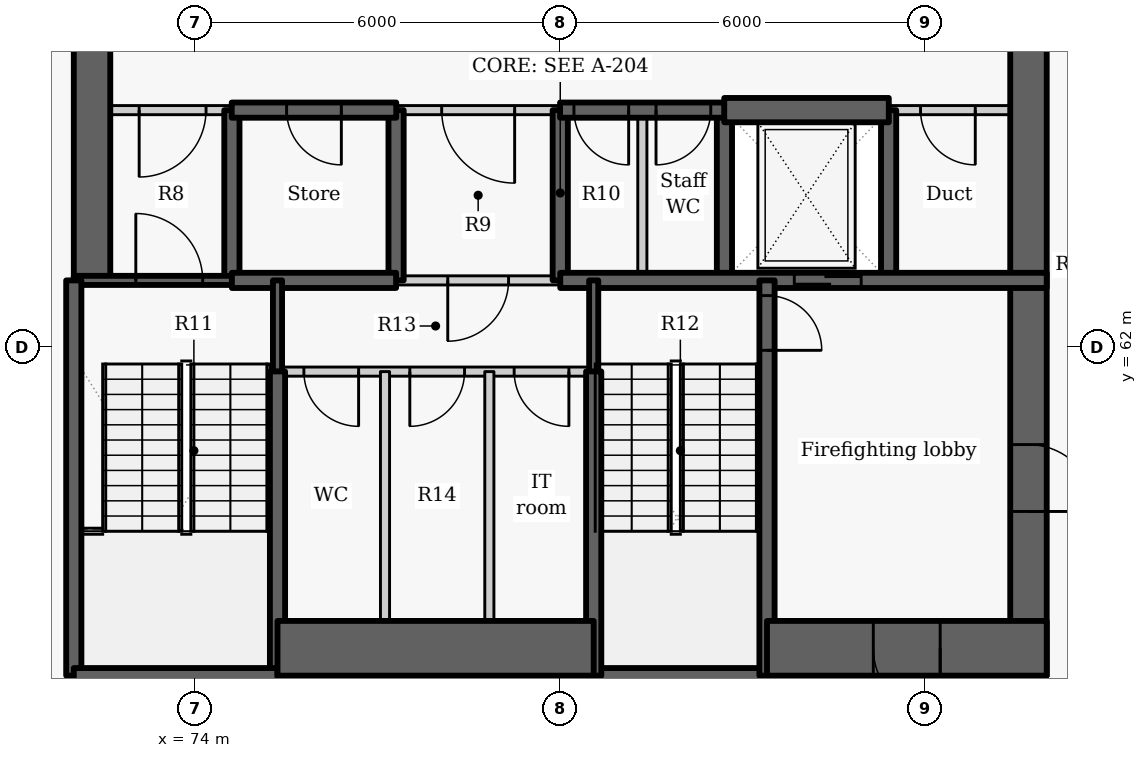
"""IFC4 building model, lengths in metres.
Left out: names, types, materials, properties, quantities, classifications, styles, units other than length and angle.
Written with IfcOpenShell. Run it as: python <this file> out.ifc"""

import sys

from ifc_helpers import new_model, si_unit, direction, frame, frame_2d, origin, place, context, subcontext, project, spatial, rectangle, extrude, element, fill, save


model = new_model("IFC4")
c1 = context("Model", 3, precision=1e-05, world=origin(), true_north=direction((0.0, 1.0)))
c2 = subcontext(c1, "Body", "Model", "MODEL_VIEW")
j1 = project(units=[si_unit("LENGTHUNIT", "METRE"), si_unit("PLANEANGLEUNIT", "RADIAN")], contexts=[c1])
p1 = place(None, origin())
s1 = spatial("IfcSite", under=j1, at=p1, CompositionType="ELEMENT")
p2 = place(p1, origin())
s2 = spatial("IfcBuilding", under=s1, at=p2, CompositionType="ELEMENT")
p3 = place(p2, frame((0.0, 0.0, 15.6)))
s3 = spatial("IfcBuildingStorey", under=s2, at=p3, CompositionType="ELEMENT", Elevation=15.6)
p4 = place(p3, frame((74.6, 63.1, -0.3), z_axis=(0.0, 0.0, 1.0), x_axis=(0.0, 1.0, 0.0)))
e1 = element("IfcWall", 1, at=p4, inside=s3, PredefinedType="SHEAR", context=c2, shape_type="SweptSolid", body=[
    extrude(rectangle(XDim=2.8, YDim=0.25, at=frame_2d((1.4, 0.0))), origin(), (0.0, 0.0, 1.0), 4.2),
])
p5 = place(p3, frame((72.3, 63.1, -0.3), z_axis=(0.0, 0.0, 1.0), x_axis=(0.0, 1.0, 0.0)))
e2 = element("IfcWall", 2, at=p5, inside=s3, PredefinedType="SHEAR", context=c2, shape_type="SweptSolid", body=[
    extrude(rectangle(XDim=9.1, YDim=0.6, at=frame_2d((4.55, 0.0))), origin(), (0.0, 0.0, 1.0), 4.2),
])
for number, where, z_axis, x_axis in (
    (3, (77.3, 63.1, -0.3), (0.0, 0.0, 1.0), (0.0, 1.0, 0.0)),
    (4, (80.0, 63.1, -0.3), (0.0, 0.0, 1.0), (0.0, 1.0, 0.0)),
    (5, (82.7, 63.1, -0.3), (0.0, 0.0, 1.0), (0.0, 1.0, 0.0)),
    (6, (85.4, 63.1, -0.3), (0.0, 0.0, 1.0), (0.0, 1.0, 0.0)),
):
    element("IfcWall", number, at=place(p3, frame(where, z_axis=z_axis, x_axis=x_axis)), inside=s3, PredefinedType="SHEAR", context=c2, shape_type="SweptSolid", body=[
        extrude(rectangle(XDim=2.8, YDim=0.25, at=frame_2d((1.4, 0.0))), origin(), (0.0, 0.0, 1.0), 4.2),
    ])
p6 = place(p3, frame((87.7, 72.2, -0.3), z_axis=(0.0, 0.0, 1.0), x_axis=(0.0, -1.0, 0.0)))
e7 = element("IfcWall", 7, at=p6, inside=s3, PredefinedType="SHEAR", context=c2, shape_type="SweptSolid", body=[
    extrude(rectangle(XDim=15.6, YDim=0.6, at=frame_2d((7.8, 0.0))), origin(), (0.0, 0.0, 1.0), 4.2),
])
p7 = place(p6, frame((11.8, 0.0, 0.3)))
e8 = element("IfcOpeningElement", 8, at=p7, cuts=e7, PredefinedType="OPENING", context=c2, shape_type="SweptSolid", body=[
    extrude(rectangle(XDim=1.1, YDim=2.1, at=frame_2d((0.55, 1.05))), frame((0.0, 0.31, 0.0), z_axis=(0.0, -1.0, 0.0), x_axis=(1.0, 0.0, 0.0)), (0.0, 0.0, 1.0), 0.62),
])
p8 = place(p3, frame((74.603, 65.9, 0.0), z_axis=(0.0, 0.0, 1.0), x_axis=(-1.0, 0.0, 0.0)))
e9 = element("IfcWall", 9, at=p8, inside=s3, PredefinedType="PARTITIONING", context=c2, shape_type="SweptSolid", body=[
    extrude(rectangle(XDim=2.603, YDim=0.15, at=frame_2d((1.302, 0.0))), origin(), (0.0, 0.0, 1.0), 3.9),
])
p9 = place(p8, frame((0.428, 0.0, 0.0)))
e10 = element("IfcOpeningElement", 10, at=p9, cuts=e9, PredefinedType="OPENING", context=c2, shape_type="SweptSolid", body=[
    extrude(rectangle(XDim=1.1, YDim=2.1, at=frame_2d((0.55, 1.05))), frame((0.0, 0.085, 0.0), z_axis=(0.0, -1.0, 0.0), x_axis=(1.0, 0.0, 0.0)), (0.0, 0.0, 1.0), 0.17),
])
p10 = place(p3, frame((80.003, 65.9, 0.0), z_axis=(0.0, 0.0, 1.0), x_axis=(-1.0, 0.0, 0.0)))
e11 = element("IfcWall", 11, at=p10, inside=s3, PredefinedType="PARTITIONING", context=c2, shape_type="SweptSolid", body=[
    extrude(rectangle(XDim=2.706, YDim=0.15, at=frame_2d((1.353, 0.0))), origin(), (0.0, 0.0, 1.0), 3.9),
])
p11 = place(p10, frame((0.753, 0.0, 0.0)))
e12 = element("IfcOpeningElement", 12, at=p11, cuts=e11, PredefinedType="OPENING", context=c2, shape_type="SweptSolid", body=[
    extrude(rectangle(XDim=1.2, YDim=2.1, at=frame_2d((0.6, 1.05))), frame((0.0, 0.085, 0.0), z_axis=(0.0, -1.0, 0.0), x_axis=(1.0, 0.0, 0.0)), (0.0, 0.0, 1.0), 0.17),
])
p12 = place(p3, frame((88.0, 65.9, 0.0), z_axis=(0.0, 0.0, 1.0), x_axis=(-1.0, 0.0, 0.0)))
e13 = element("IfcWall", 13, at=p12, inside=s3, PredefinedType="PARTITIONING", context=c2, shape_type="SweptSolid", body=[
    extrude(rectangle(XDim=2.603, YDim=0.15, at=frame_2d((1.302, 0.0))), origin(), (0.0, 0.0, 1.0), 3.9),
])
p13 = place(p12, frame((1.175, 0.0, 0.0)))
e14 = element("IfcOpeningElement", 14, at=p13, cuts=e13, PredefinedType="OPENING", context=c2, shape_type="SweptSolid", body=[
    extrude(rectangle(XDim=0.9, YDim=2.1, at=frame_2d((0.45, 1.05))), frame((0.0, 0.085, 0.0), z_axis=(0.0, -1.0, 0.0), x_axis=(1.0, 0.0, 0.0)), (0.0, 0.0, 1.0), 0.17),
])
p14 = place(p3, frame((77.303, 65.9, -0.3), z_axis=(0.0, 0.0, 1.0), x_axis=(-1.0, 0.0, 0.0)))
e15 = element("IfcWall", 15, at=p14, inside=s3, PredefinedType="SHEAR", context=c2, shape_type="SweptSolid", body=[
    extrude(rectangle(XDim=2.706, YDim=0.25, at=frame_2d((1.353, 0.0))), origin(), (0.0, 0.0, 1.0), 4.2),
])
p15 = place(p14, frame((0.903, 0.0, 0.3)))
e16 = element("IfcOpeningElement", 16, at=p15, cuts=e15, PredefinedType="OPENING", context=c2, shape_type="SweptSolid", body=[
    extrude(rectangle(XDim=0.9, YDim=2.1, at=frame_2d((0.45, 1.05))), frame((0.0, 0.135, 0.0), z_axis=(0.0, -1.0, 0.0), x_axis=(1.0, 0.0, 0.0)), (0.0, 0.0, 1.0), 0.27),
])
p16 = place(p3, frame((82.703, 65.9, -0.3), z_axis=(0.0, 0.0, 1.0), x_axis=(-1.0, 0.0, 0.0)))
e17 = element("IfcWall", 17, at=p16, inside=s3, PredefinedType="SHEAR", context=c2, shape_type="SweptSolid", body=[
    extrude(rectangle(XDim=2.706, YDim=0.25, at=frame_2d((1.353, 0.0))), origin(), (0.0, 0.0, 1.0), 4.2),
])
p17 = place(p16, frame((1.578, 0.0, 0.3)))
e18 = element("IfcOpeningElement", 18, at=p17, cuts=e17, PredefinedType="OPENING", context=c2, shape_type="SweptSolid", body=[
    extrude(rectangle(XDim=0.9, YDim=2.1, at=frame_2d((0.45, 1.05))), frame((0.0, 0.135, 0.0), z_axis=(0.0, -1.0, 0.0), x_axis=(1.0, 0.0, 0.0)), (0.0, 0.0, 1.0), 0.27),
])
p18 = place(p16, frame((0.228, 0.0, 0.3)))
e19 = element("IfcOpeningElement", 19, at=p18, cuts=e17, PredefinedType="OPENING", context=c2, shape_type="SweptSolid", body=[
    extrude(rectangle(XDim=0.9, YDim=2.1, at=frame_2d((0.45, 1.05))), frame((0.0, 0.135, 0.0), z_axis=(0.0, -1.0, 0.0), x_axis=(1.0, 0.0, 0.0)), (0.0, 0.0, 1.0), 0.27),
])
p19 = place(p3, frame((82.697, 65.9, -0.3), z_axis=(0.0, 0.0, 1.0), x_axis=(1.0, 0.0, 0.0)))
e20 = element("IfcWall", 20, at=p19, inside=s3, PredefinedType="SHEAR", context=c2, shape_type="SweptSolid", body=[
    extrude(rectangle(XDim=2.706, YDim=0.4, at=frame_2d((1.353, 0.0))), origin(), (0.0, 0.0, 1.0), 4.2),
])
p20 = place(p3, frame((72.0, 63.1, -0.3), z_axis=(0.0, 0.0, 1.0), x_axis=(1.0, 0.0, 0.0)))
e21 = element("IfcWall", 21, at=p20, inside=s3, PredefinedType="SHEAR", context=c2, shape_type="SweptSolid", body=[
    extrude(rectangle(XDim=2.6, YDim=0.15, at=frame_2d((1.3, 0.0))), origin(), (0.0, 0.0, 1.0), 4.2),
])
p21 = place(p20, frame((1.02, 0.0, 0.3)))
e22 = element("IfcOpeningElement", 22, at=p21, cuts=e21, PredefinedType="OPENING", context=c2, shape_type="SweptSolid", body=[
    extrude(rectangle(XDim=1.1, YDim=2.1, at=frame_2d((0.55, 1.05))), frame((0.0, 0.085, 0.0), z_axis=(0.0, -1.0, 0.0), x_axis=(1.0, 0.0, 0.0)), (0.0, 0.0, 1.0), 0.17),
])
p22 = place(p3, frame((74.6, 63.1, -0.3), z_axis=(0.0, 0.0, 1.0), x_axis=(1.0, 0.0, 0.0)))
e23 = element("IfcWall", 23, at=p22, inside=s3, PredefinedType="SHEAR", context=c2, shape_type="SweptSolid", body=[
    extrude(rectangle(XDim=2.7, YDim=0.25, at=frame_2d((1.35, 0.0))), origin(), (0.0, 0.0, 1.0), 4.2),
])
p23 = place(p3, frame((80.0, 63.1, -0.3), z_axis=(0.0, 0.0, 1.0), x_axis=(1.0, 0.0, 0.0)))
e24 = element("IfcWall", 24, at=p23, inside=s3, PredefinedType="SHEAR", context=c2, shape_type="SweptSolid", body=[
    extrude(rectangle(XDim=8.0, YDim=0.25, at=frame_2d((4.0, 0.0))), origin(), (0.0, 0.0, 1.0), 4.2),
])
p24 = place(p23, frame((3.849, 0.0, 0.3)))
e25 = element("IfcOpeningElement", 25, at=p24, cuts=e24, PredefinedType="OPENING", context=c2, shape_type="SweptSolid", body=[
    extrude(rectangle(XDim=1.1, YDim=2.1, at=frame_2d((0.55, 1.05))), frame((0.0, 0.135, 0.0), z_axis=(0.0, -1.0, 0.0), x_axis=(1.0, 0.0, 0.0)), (0.0, 0.0, 1.0), 0.27),
])
p25 = place(p3, frame((80.0, 63.1, 0.0), z_axis=(0.0, 0.0, 1.0), x_axis=(-1.0, 0.0, 0.0)))
e26 = element("IfcWall", 26, at=p25, inside=s3, PredefinedType="PARTITIONING", context=c2, shape_type="SweptSolid", body=[
    extrude(rectangle(XDim=2.7, YDim=0.15, at=frame_2d((1.35, 0.0))), origin(), (0.0, 0.0, 1.0), 3.9),
])
p26 = place(p25, frame((0.85, 0.0, 0.0)))
e27 = element("IfcOpeningElement", 27, at=p26, cuts=e26, PredefinedType="OPENING", context=c2, shape_type="SweptSolid", body=[
    extrude(rectangle(XDim=1.0, YDim=2.1, at=frame_2d((0.5, 1.05))), frame((0.0, 0.085, 0.0), z_axis=(0.0, -1.0, 0.0), x_axis=(1.0, 0.0, 0.0)), (0.0, 0.0, 1.0), 0.17),
])
p27 = place(p3, frame((81.35, 63.1, 0.0), z_axis=(0.0, 0.0, 1.0), x_axis=(0.0, 1.0, 0.0)))
e28 = element("IfcWall", 28, at=p27, inside=s3, PredefinedType="PARTITIONING", context=c2, shape_type="SweptSolid", body=[
    extrude(rectangle(XDim=2.8, YDim=0.15, at=frame_2d((1.4, 0.0))), origin(), (0.0, 0.0, 1.0), 3.9),
])
p28 = place(p3, frame((75.35, 61.597, -0.3), z_axis=(0.0, 0.0, 1.0), x_axis=(0.0, 1.0, 0.0)))
e29 = element("IfcWall", 29, at=p28, inside=s3, PredefinedType="SHEAR", context=c2, shape_type="SweptSolid", body=[
    extrude(rectangle(XDim=1.503, YDim=0.15, at=frame_2d((0.751, 0.0))), origin(), (0.0, 0.0, 1.0), 4.2),
])
p29 = place(p3, frame((75.35, 56.6, -0.3), z_axis=(0.0, 0.0, 1.0), x_axis=(0.0, 1.0, 0.0)))
e30 = element("IfcWall", 30, at=p29, inside=s3, PredefinedType="SHEAR", context=c2, shape_type="SweptSolid", body=[
    extrude(rectangle(XDim=5.003, YDim=0.25, at=frame_2d((2.501, 0.0))), origin(), (0.0, 0.0, 1.0), 4.2),
])
p30 = place(p3, frame((72.0, 56.6, -0.3), z_axis=(0.0, 0.0, 1.0), x_axis=(0.0, 1.0, 0.0)))
e31 = element("IfcWall", 31, at=p30, inside=s3, PredefinedType="SHEAR", context=c2, shape_type="SweptSolid", body=[
    extrude(rectangle(XDim=6.5, YDim=0.25, at=frame_2d((3.25, 0.0))), origin(), (0.0, 0.0, 1.0), 4.2),
])
p31 = place(p3, frame((72.0, 56.6, -0.3), z_axis=(0.0, 0.0, 1.0), x_axis=(1.0, 0.0, 0.0)))
e32 = element("IfcWall", 32, at=p31, inside=s3, PredefinedType="SHEAR", context=c2, shape_type="SweptSolid", body=[
    extrude(rectangle(XDim=3.35, YDim=0.25, at=frame_2d((1.675, 0.0))), origin(), (0.0, 0.0, 1.0), 4.2),
])
p32 = place(p3, frame((80.55, 56.6, -0.3), z_axis=(0.0, 0.0, 1.0), x_axis=(1.0, 0.0, 0.0)))
e33 = element("IfcWall", 33, at=p32, inside=s3, PredefinedType="SHEAR", context=c2, shape_type="SweptSolid", body=[
    extrude(rectangle(XDim=2.85, YDim=0.25, at=frame_2d((1.425, 0.0))), origin(), (0.0, 0.0, 1.0), 4.2),
])
p33 = place(p3, frame((83.4, 63.1, -0.3), z_axis=(0.0, 0.0, 1.0), x_axis=(0.0, -1.0, 0.0)))
e34 = element("IfcWall", 34, at=p33, inside=s3, PredefinedType="SHEAR", context=c2, shape_type="SweptSolid", body=[
    extrude(rectangle(XDim=6.5, YDim=0.25, at=frame_2d((3.25, 0.0))), origin(), (0.0, 0.0, 1.0), 4.2),
])
p34 = place(p33, frame((0.25, 0.0, 0.3)))
e35 = element("IfcOpeningElement", 35, at=p34, cuts=e34, PredefinedType="OPENING", context=c2, shape_type="SweptSolid", body=[
    extrude(rectangle(XDim=0.9, YDim=2.1, at=frame_2d((0.45, 1.05))), frame((0.0, 0.135, 0.0), z_axis=(0.0, -1.0, 0.0), x_axis=(1.0, 0.0, 0.0)), (0.0, 0.0, 1.0), 0.27),
])
p35 = place(p3, frame((80.55, 61.597, -0.3), z_axis=(0.0, 0.0, 1.0), x_axis=(0.0, 1.0, 0.0)))
e36 = element("IfcWall", 36, at=p35, inside=s3, PredefinedType="SHEAR", context=c2, shape_type="SweptSolid", body=[
    extrude(rectangle(XDim=1.503, YDim=0.15, at=frame_2d((0.751, 0.0))), origin(), (0.0, 0.0, 1.0), 4.2),
])
p36 = place(p3, frame((80.55, 56.6, -0.3), z_axis=(0.0, 0.0, 1.0), x_axis=(0.0, 1.0, 0.0)))
e37 = element("IfcWall", 37, at=p36, inside=s3, PredefinedType="SHEAR", context=c2, shape_type="SweptSolid", body=[
    extrude(rectangle(XDim=5.003, YDim=0.25, at=frame_2d((2.501, 0.0))), origin(), (0.0, 0.0, 1.0), 4.2),
])
p37 = place(p3, frame((75.35, 57.05, -0.3), z_axis=(0.0, 0.0, 1.0), x_axis=(1.0, 0.0, 0.0)))
e38 = element("IfcWall", 38, at=p37, inside=s3, PredefinedType="SHEAR", context=c2, shape_type="SweptSolid", body=[
    extrude(rectangle(XDim=5.2, YDim=0.9, at=frame_2d((2.6, 0.0))), origin(), (0.0, 0.0, 1.0), 4.2),
])
p38 = place(p3, frame((88.0, 57.05, -0.3), z_axis=(0.0, 0.0, 1.0), x_axis=(-1.0, 0.0, 0.0)))
e39 = element("IfcWall", 39, at=p38, inside=s3, PredefinedType="SHEAR", context=c2, shape_type="SweptSolid", body=[
    extrude(rectangle(XDim=4.6, YDim=0.9, at=frame_2d((2.3, 0.0))), origin(), (0.0, 0.0, 1.0), 4.2),
])
p39 = place(p38, frame((1.752, 0.0, 0.3)))
e40 = element("IfcOpeningElement", 40, at=p39, cuts=e39, PredefinedType="OPENING", context=c2, shape_type="SweptSolid", body=[
    extrude(rectangle(XDim=1.1, YDim=2.1, at=frame_2d((0.55, 1.05))), frame((0.0, 0.46, 0.0), z_axis=(0.0, -1.0, 0.0), x_axis=(1.0, 0.0, 0.0)), (0.0, 0.0, 1.0), 0.92),
])
p40 = place(p3, frame((80.55, 61.6, 0.0), z_axis=(0.0, 0.0, 1.0), x_axis=(-1.0, 0.0, 0.0)))
e41 = element("IfcWall", 41, at=p40, inside=s3, PredefinedType="PARTITIONING", context=c2, shape_type="SweptSolid", body=[
    extrude(rectangle(XDim=5.2, YDim=0.15, at=frame_2d((2.6, 0.0))), origin(), (0.0, 0.0, 1.0), 3.9),
])
p41 = place(p40, frame((3.866, 0.0, 0.0)))
e42 = element("IfcOpeningElement", 42, at=p41, cuts=e41, PredefinedType="OPENING", context=c2, shape_type="SweptSolid", body=[
    extrude(rectangle(XDim=0.9, YDim=2.1, at=frame_2d((0.45, 1.05))), frame((0.0, 0.085, 0.0), z_axis=(0.0, -1.0, 0.0), x_axis=(1.0, 0.0, 0.0)), (0.0, 0.0, 1.0), 0.17),
])
p42 = place(p40, frame((2.124, 0.0, 0.0)))
e43 = element("IfcOpeningElement", 43, at=p42, cuts=e41, PredefinedType="OPENING", context=c2, shape_type="SweptSolid", body=[
    extrude(rectangle(XDim=0.9, YDim=2.1, at=frame_2d((0.45, 1.05))), frame((0.0, 0.085, 0.0), z_axis=(0.0, -1.0, 0.0), x_axis=(1.0, 0.0, 0.0)), (0.0, 0.0, 1.0), 0.17),
])
p43 = place(p40, frame((0.408, 0.0, 0.0)))
e44 = element("IfcOpeningElement", 44, at=p43, cuts=e41, PredefinedType="OPENING", context=c2, shape_type="SweptSolid", body=[
    extrude(rectangle(XDim=0.9, YDim=2.1, at=frame_2d((0.45, 1.05))), frame((0.0, 0.085, 0.0), z_axis=(0.0, -1.0, 0.0), x_axis=(1.0, 0.0, 0.0)), (0.0, 0.0, 1.0), 0.17),
])
for number, where, z_axis, x_axis in (
    (45, (77.118, 56.6, 0.0), (0.0, 0.0, 1.0), (0.0, 1.0, 0.0)),
    (46, (78.834, 56.6, 0.0), (0.0, 0.0, 1.0), (0.0, 1.0, 0.0)),
):
    element("IfcWall", number, at=place(p3, frame(where, z_axis=z_axis, x_axis=x_axis)), inside=s3, PredefinedType="PARTITIONING", context=c2, shape_type="SweptSolid", body=[
        extrude(rectangle(XDim=5.0, YDim=0.15, at=frame_2d((2.5, 0.0))), origin(), (0.0, 0.0, 1.0), 3.9),
    ])
p44 = place(p9, origin())
e47 = element("IfcDoor", 47, at=p44, inside=s3, OperationType="SINGLE_SWING_RIGHT", PredefinedType="DOOR", context=c2, shape_type="SweptSolid", body=[
    extrude(rectangle(XDim=1.1, YDim=2.1, at=frame_2d((0.55, 1.05))), frame((0.0, 0.025, 0.0), z_axis=(0.0, -1.0, 0.0), x_axis=(1.0, 0.0, 0.0)), (0.0, 0.0, 1.0), 0.05),
])
fill(e10, e47)
p45 = place(p15, origin())
e48 = element("IfcDoor", 48, at=p45, inside=s3, OperationType="SINGLE_SWING_LEFT", PredefinedType="DOOR", context=c2, shape_type="SweptSolid", body=[
    extrude(rectangle(XDim=0.9, YDim=2.1, at=frame_2d((0.45, 1.05))), frame((0.0, 0.025, 0.0), z_axis=(0.0, -1.0, 0.0), x_axis=(1.0, 0.0, 0.0)), (0.0, 0.0, 1.0), 0.05),
])
fill(e16, e48)
p46 = place(p11, origin())
e49 = element("IfcDoor", 49, at=p46, inside=s3, OperationType="DOUBLE_DOOR_SINGLE_SWING", PredefinedType="DOOR", context=c2, shape_type="SweptSolid", body=[
    extrude(rectangle(XDim=1.2, YDim=2.1, at=frame_2d((0.6, 1.05))), frame((0.0, 0.025, 0.0), z_axis=(0.0, -1.0, 0.0), x_axis=(1.0, 0.0, 0.0)), (0.0, 0.0, 1.0), 0.05),
])
fill(e12, e49)
p47 = place(p17, origin())
e50 = element("IfcDoor", 50, at=p47, inside=s3, OperationType="SINGLE_SWING_LEFT", PredefinedType="DOOR", context=c2, shape_type="SweptSolid", body=[
    extrude(rectangle(XDim=0.9, YDim=2.1, at=frame_2d((0.45, 1.05))), frame((0.0, 0.025, 0.0), z_axis=(0.0, -1.0, 0.0), x_axis=(1.0, 0.0, 0.0)), (0.0, 0.0, 1.0), 0.05),
])
fill(e18, e50)
p48 = place(p18, origin())
e51 = element("IfcDoor", 51, at=p48, inside=s3, OperationType="SINGLE_SWING_RIGHT", PredefinedType="DOOR", context=c2, shape_type="SweptSolid", body=[
    extrude(rectangle(XDim=0.9, YDim=2.1, at=frame_2d((0.45, 1.05))), frame((0.0, 0.025, 0.0), z_axis=(0.0, -1.0, 0.0), x_axis=(1.0, 0.0, 0.0)), (0.0, 0.0, 1.0), 0.05),
])
fill(e19, e51)
p49 = place(p24, origin())
e52 = element("IfcDoor", 52, at=p49, inside=s3, OperationType="SLIDING_TO_LEFT", PredefinedType="DOOR", context=c2, shape_type="SweptSolid", body=[
    extrude(rectangle(XDim=1.1, YDim=2.1, at=frame_2d((0.55, 1.05))), frame((0.0, 0.025, 0.0), z_axis=(0.0, -1.0, 0.0), x_axis=(1.0, 0.0, 0.0)), (0.0, 0.0, 1.0), 0.05),
])
fill(e25, e52)
p50 = place(p13, origin())
e53 = element("IfcDoor", 53, at=p50, inside=s3, OperationType="SINGLE_SWING_LEFT", PredefinedType="DOOR", context=c2, shape_type="SweptSolid", body=[
    extrude(rectangle(XDim=0.9, YDim=2.1, at=frame_2d((0.45, 1.05))), frame((0.0, 0.025, 0.0), z_axis=(0.0, -1.0, 0.0), x_axis=(1.0, 0.0, 0.0)), (0.0, 0.0, 1.0), 0.05),
])
fill(e14, e53)
p51 = place(p26, origin())
e54 = element("IfcDoor", 54, at=p51, inside=s3, OperationType="SINGLE_SWING_RIGHT", PredefinedType="DOOR", context=c2, shape_type="SweptSolid", body=[
    extrude(rectangle(XDim=1.0, YDim=2.1, at=frame_2d((0.5, 1.05))), frame((0.0, 0.025, 0.0), z_axis=(0.0, -1.0, 0.0), x_axis=(1.0, 0.0, 0.0)), (0.0, 0.0, 1.0), 0.05),
])
fill(e27, e54)
p52 = place(p41, origin())
e55 = element("IfcDoor", 55, at=p52, inside=s3, OperationType="SINGLE_SWING_LEFT", PredefinedType="DOOR", context=c2, shape_type="SweptSolid", body=[
    extrude(rectangle(XDim=0.9, YDim=2.1, at=frame_2d((0.45, 1.05))), frame((0.0, 0.025, 0.0), z_axis=(0.0, -1.0, 0.0), x_axis=(1.0, 0.0, 0.0)), (0.0, 0.0, 1.0), 0.05),
])
fill(e42, e55)
p53 = place(p42, origin())
e56 = element("IfcDoor", 56, at=p53, inside=s3, OperationType="SINGLE_SWING_RIGHT", PredefinedType="DOOR", context=c2, shape_type="SweptSolid", body=[
    extrude(rectangle(XDim=0.9, YDim=2.1, at=frame_2d((0.45, 1.05))), frame((0.0, 0.025, 0.0), z_axis=(0.0, -1.0, 0.0), x_axis=(1.0, 0.0, 0.0)), (0.0, 0.0, 1.0), 0.05),
])
fill(e43, e56)
p54 = place(p43, origin())
e57 = element("IfcDoor", 57, at=p54, inside=s3, OperationType="SINGLE_SWING_LEFT", PredefinedType="DOOR", context=c2, shape_type="SweptSolid", body=[
    extrude(rectangle(XDim=0.9, YDim=2.1, at=frame_2d((0.45, 1.05))), frame((0.0, 0.025, 0.0), z_axis=(0.0, -1.0, 0.0), x_axis=(1.0, 0.0, 0.0)), (0.0, 0.0, 1.0), 0.05),
])
fill(e44, e57)
p55 = place(p21, origin())
e58 = element("IfcDoor", 58, at=p55, inside=s3, OperationType="SINGLE_SWING_LEFT", PredefinedType="DOOR", context=c2, shape_type="SweptSolid", body=[
    extrude(rectangle(XDim=1.1, YDim=2.1, at=frame_2d((0.55, 1.05))), frame((0.0, 0.025, 0.0), z_axis=(0.0, -1.0, 0.0), x_axis=(1.0, 0.0, 0.0)), (0.0, 0.0, 1.0), 0.05),
])
fill(e22, e58)
p56 = place(p34, origin())
e59 = element("IfcDoor", 59, at=p56, inside=s3, OperationType="SINGLE_SWING_RIGHT", PredefinedType="DOOR", context=c2, shape_type="SweptSolid", body=[
    extrude(rectangle(XDim=0.9, YDim=2.1, at=frame_2d((0.45, 1.05))), frame((0.0, 0.025, 0.0), z_axis=(0.0, -1.0, 0.0), x_axis=(1.0, 0.0, 0.0)), (0.0, 0.0, 1.0), 0.05),
])
fill(e35, e59)
p57 = place(p7, origin())
e60 = element("IfcDoor", 60, at=p57, inside=s3, OperationType="SINGLE_SWING_RIGHT", PredefinedType="DOOR", context=c2, shape_type="SweptSolid", body=[
    extrude(rectangle(XDim=1.1, YDim=2.1, at=frame_2d((0.55, 1.05))), frame((0.0, 0.025, 0.0), z_axis=(0.0, -1.0, 0.0), x_axis=(1.0, 0.0, 0.0)), (0.0, 0.0, 1.0), 0.05),
])
fill(e8, e60)
p58 = place(p39, origin())
e61 = element("IfcDoor", 61, at=p58, inside=s3, OperationType="SINGLE_SWING_LEFT", PredefinedType="DOOR", context=c2, shape_type="SweptSolid", body=[
    extrude(rectangle(XDim=1.1, YDim=2.1, at=frame_2d((0.55, 1.05))), frame((0.0, 0.025, 0.0), z_axis=(0.0, -1.0, 0.0), x_axis=(1.0, 0.0, 0.0)), (0.0, 0.0, 1.0), 0.05),
])
fill(e40, e61)
save(model, sys.argv[1])
